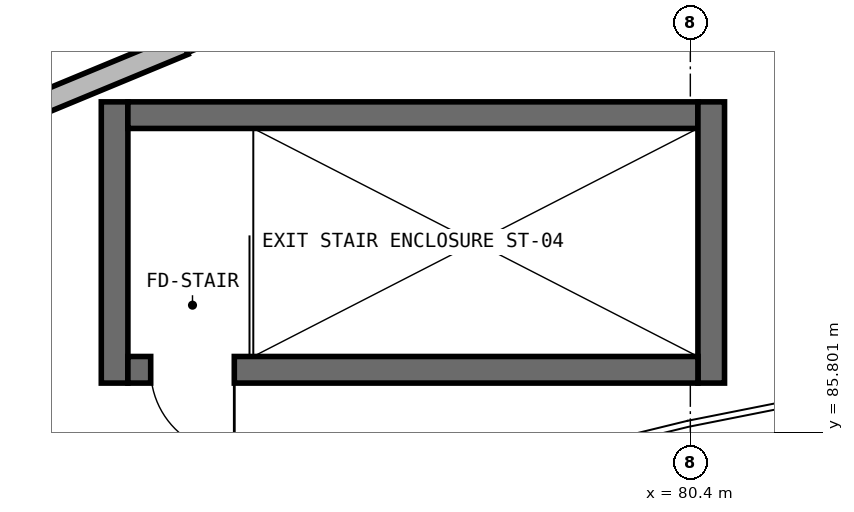
"""IFC4 building model, lengths in metres.
Left out: names, types, materials, properties, quantities, classifications, styles, units other than length and angle.
Written with IfcOpenShell. Run it as: python <this file> out.ifc"""

import sys

from ifc_helpers import new_model, si_unit, direction, frame, frame_2d, origin, place, context, subcontext, project, spatial, rectangle, extrude, element, fill, save


model = new_model("IFC4")
c1 = context("Model", 3, precision=1e-05, world=origin(), true_north=direction((0.0, 1.0)))
c2 = subcontext(c1, "Body", "Model", "MODEL_VIEW")
j1 = project(units=[si_unit("LENGTHUNIT", "METRE"), si_unit("PLANEANGLEUNIT", "RADIAN")], contexts=[c1])
p1 = place(None, origin())
s1 = spatial("IfcSite", under=j1, at=p1, CompositionType="ELEMENT")
p2 = place(p1, origin())
s2 = spatial("IfcBuilding", under=s1, at=p2, CompositionType="ELEMENT")
p3 = place(p2, frame((0.0, 0.0, 14.35)))
s3 = spatial("IfcBuildingStorey", under=s2, at=p3, CompositionType="ELEMENT", Elevation=14.35)
p4 = place(p3, frame((72.825, 86.45, 0.0), z_axis=(0.0, 0.0, 1.0), x_axis=(0.0, 1.0, 0.0)))
e1 = element("IfcWall", 1, at=p4, inside=s3, PredefinedType="SHEAR", context=c2, shape_type="SweptSolid", body=[
    extrude(rectangle(XDim=3.7, YDim=0.35, at=frame_2d((1.85, 0.0))), origin(), (0.0, 0.0, 1.0), 4.35),
])
p5 = place(p3, frame((73.0, 89.975, 0.0), z_axis=(0.0, 0.0, 1.0), x_axis=(1.0, 0.0, 0.0)))
e2 = element("IfcWall", 2, at=p5, inside=s3, PredefinedType="SHEAR", context=c2, shape_type="SweptSolid", body=[
    extrude(rectangle(XDim=7.5, YDim=0.35, at=frame_2d((3.75, 0.0))), origin(), (0.0, 0.0, 1.0), 4.35),
])
p6 = place(p3, frame((80.675, 90.15, 0.0), z_axis=(0.0, 0.0, 1.0), x_axis=(0.0, -1.0, 0.0)))
e3 = element("IfcWall", 3, at=p6, inside=s3, PredefinedType="SHEAR", context=c2, shape_type="SweptSolid", body=[
    extrude(rectangle(XDim=3.7, YDim=0.35, at=frame_2d((1.85, 0.0))), origin(), (0.0, 0.0, 1.0), 4.35),
])
p7 = place(p3, frame((80.5, 86.625, 0.0), z_axis=(0.0, 0.0, 1.0), x_axis=(-1.0, 0.0, 0.0)))
e4 = element("IfcWall", 4, at=p7, inside=s3, PredefinedType="SHEAR", context=c2, shape_type="SweptSolid", body=[
    extrude(rectangle(XDim=7.5, YDim=0.35, at=frame_2d((3.75, 0.0))), origin(), (0.0, 0.0, 1.0), 4.35),
])
p8 = place(p7, frame((6.1, 0.0, 0.0)))
e5 = element("IfcOpeningElement", 5, at=p8, cuts=e4, PredefinedType="OPENING", context=c2, shape_type="SweptSolid", body=[
    extrude(rectangle(XDim=1.1, YDim=2.15, at=frame_2d((0.55, 1.075))), frame((0.0, 0.185, 0.0), z_axis=(0.0, -1.0, 0.0), x_axis=(1.0, 0.0, 0.0)), (0.0, 0.0, 1.0), 0.37),
])
p9 = place(p3, frame((76.988, 93.341, 0.0), z_axis=(0.0, 0.0, 1.0), x_axis=(-0.92385889973, -0.382733240508, 0.0)))
e6 = element("IfcWall", 6, at=p9, inside=s3, PredefinedType="SOLIDWALL", context=c2, shape_type="SweptSolid", body=[
    extrude(rectangle(XDim=10.081, YDim=0.29, at=frame_2d((5.04, 0.0))), origin(), (0.0, 0.0, 1.0), 4.37),
])
p10 = place(p9, frame((4.24, 0.0, 0.95)))
e7 = element("IfcOpeningElement", 7, at=p10, cuts=e6, PredefinedType="OPENING", context=c2, shape_type="SweptSolid", body=[
    extrude(rectangle(XDim=1.6, YDim=1.35, at=frame_2d((0.8, 0.675))), frame((0.0, 0.155, 0.0), z_axis=(0.0, -1.0, 0.0), x_axis=(1.0, 0.0, 0.0)), (0.0, 0.0, 1.0), 0.31),
])
p11 = place(p3, frame((68.179, 88.607, 0.0), z_axis=(0.0, 0.0, 1.0), x_axis=(0.923848052238, 0.382759423628, 0.0)))
e8 = element("IfcWall", 8, at=p11, inside=s3, PredefinedType="SOLIDWALL", context=c2, shape_type="SweptSolid", body=[
    extrude(rectangle(XDim=9.821, YDim=0.29, at=frame_2d((4.91, 0.0))), origin(), (0.0, 0.0, 1.0), 4.37),
])
p12 = place(p11, frame((1.105, 0.0, 0.95)))
e9 = element("IfcOpeningElement", 9, at=p12, cuts=e8, PredefinedType="OPENING", context=c2, shape_type="SweptSolid", body=[
    extrude(rectangle(XDim=2.7, YDim=1.56, at=frame_2d((1.35, 0.78))), frame((0.0, 0.155, 0.0), z_axis=(0.0, -1.0, 0.0), x_axis=(1.0, 0.0, 0.0)), (0.0, 0.0, 1.0), 0.31),
])
p13 = place(p11, frame((6.016, 0.0, 0.95)))
e10 = element("IfcOpeningElement", 10, at=p13, cuts=e8, PredefinedType="OPENING", context=c2, shape_type="SweptSolid", body=[
    extrude(rectangle(XDim=2.7, YDim=1.56, at=frame_2d((1.35, 0.78))), frame((0.0, 0.155, 0.0), z_axis=(0.0, -1.0, 0.0), x_axis=(1.0, 0.0, 0.0)), (0.0, 0.0, 1.0), 0.31),
])
p14 = place(p8, origin())
e11 = element("IfcDoor", 11, at=p14, inside=s3, OperationType="SINGLE_SWING_LEFT", PredefinedType="DOOR", context=c2, shape_type="SweptSolid", body=[
    extrude(rectangle(XDim=1.1, YDim=2.15, at=frame_2d((0.55, 1.075))), frame((0.0, 0.025, 0.0), z_axis=(0.0, -1.0, 0.0), x_axis=(1.0, 0.0, 0.0)), (0.0, 0.0, 1.0), 0.05),
])
fill(e5, e11)
save(model, sys.argv[1])
